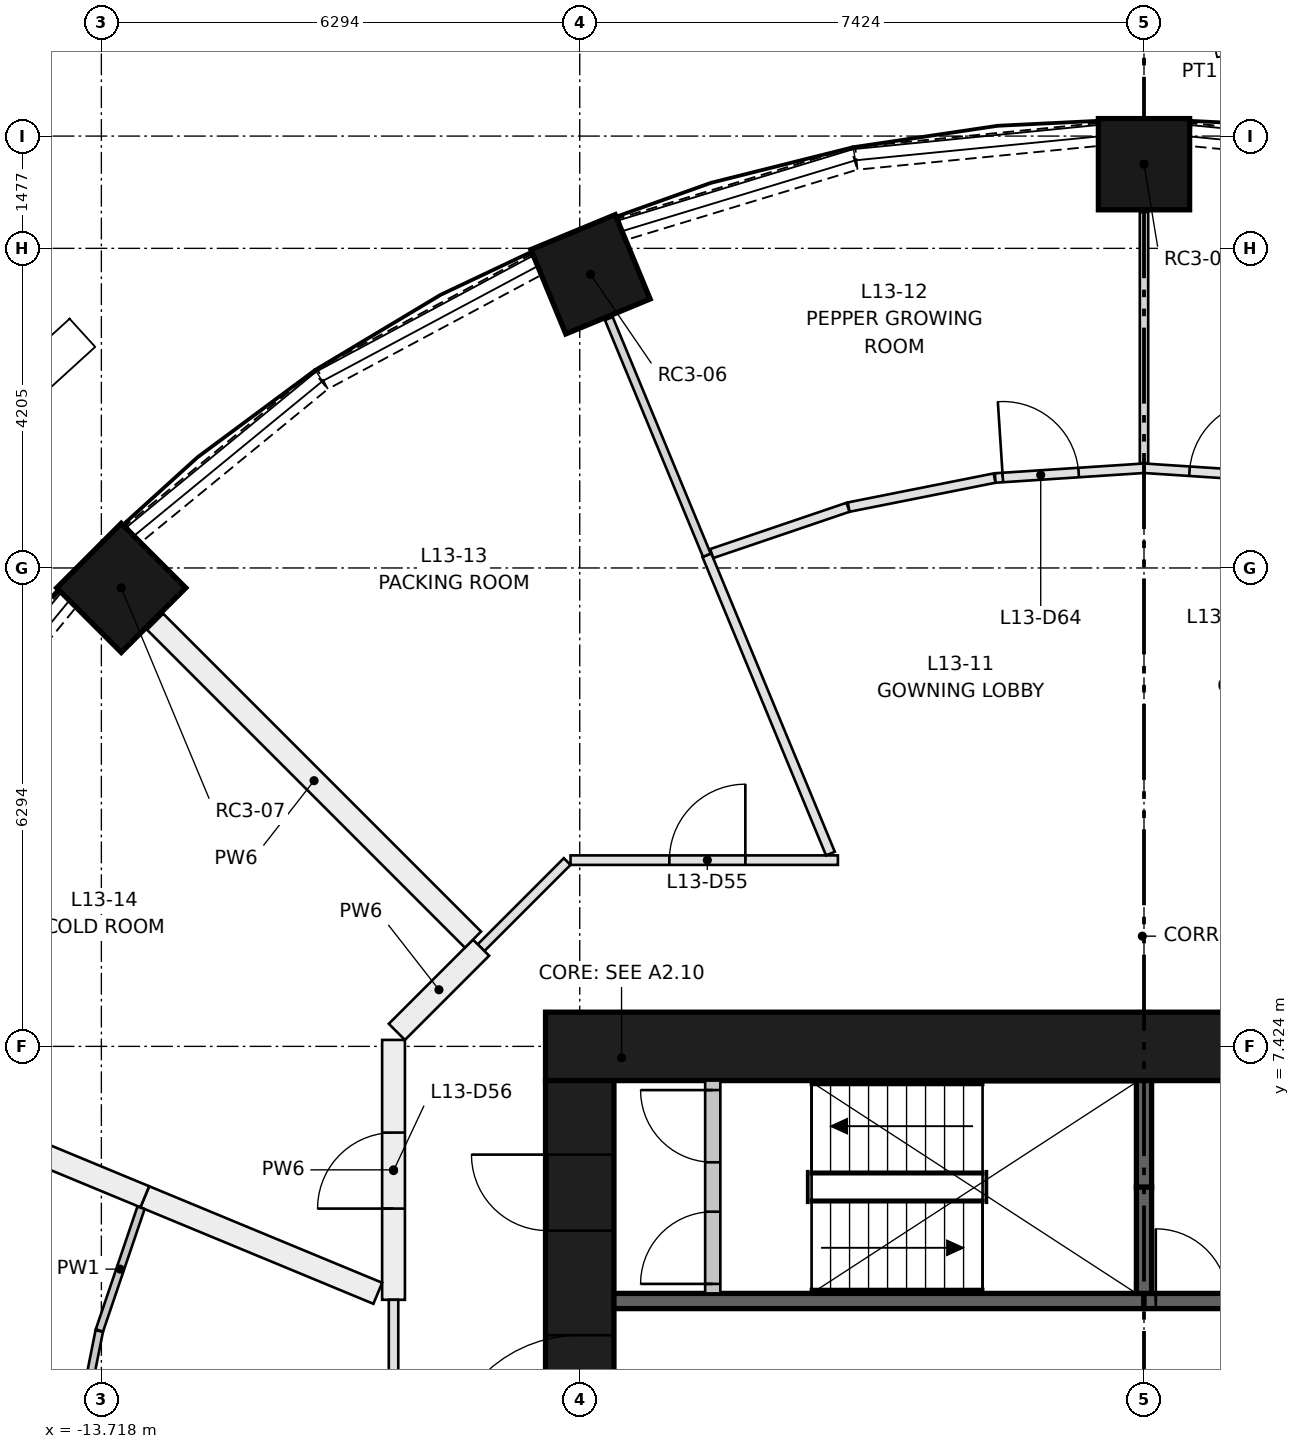
"""IFC4 building model, lengths in metres.
Left out: names, types, materials, properties, quantities, classifications, styles, units other than length and angle.
Written with IfcOpenShell. Run it as: python <this file> out.ifc"""

import sys

from ifc_helpers import new_model, si_unit, direction, frame, frame_2d, origin, origin_2d, place, context, subcontext, project, spatial, rectangle, extrude, element, fill, save


model = new_model("IFC4")
c1 = context("Model", 3, precision=1e-05, world=origin(), true_north=direction((0.0, 1.0)))
c2 = subcontext(c1, "Body", "Model", "MODEL_VIEW")
j1 = project(units=[si_unit("LENGTHUNIT", "METRE"), si_unit("PLANEANGLEUNIT", "RADIAN")], contexts=[c1])
p1 = place(None, origin())
s1 = spatial("IfcSite", under=j1, at=p1, CompositionType="ELEMENT")
p2 = place(p1, origin())
s2 = spatial("IfcBuilding", under=s1, at=p2, CompositionType="ELEMENT")
p3 = place(p2, frame((0.0, 0.0, 51.75)))
s3 = spatial("IfcBuildingStorey", under=s2, at=p3, CompositionType="ELEMENT", Elevation=51.75)
for number, where, z_axis, x_axis in (
    (1, (0.0, 19.03, 0.0), (0.0, 0.0, 1.0), (0.0, 1.0, 0.0)),
    (2, (-7.282, 17.582, 0.0), (0.0, 0.0, 1.0), (-0.383, 0.924, 0.0)),
    (3, (-13.456, 13.456, 0.0), (0.0, 0.0, 1.0), (-0.707, 0.707, 0.0)),
):
    element("IfcColumn", number, at=place(p3, frame(where, z_axis=z_axis, x_axis=x_axis)), inside=s3, PredefinedType="COLUMN", context=c2, shape_type="SweptSolid", body=[
        extrude(rectangle(XDim=1.2, YDim=1.2, at=origin_2d()), origin(), (0.0, 0.0, 1.0), 3.65),
    ])
p4 = place(p3, frame((-7.874, 7.424, 0.0), z_axis=(0.0, 0.0, 1.0), x_axis=(1.0, 0.0, 0.0)))
e4 = element("IfcWall", 4, at=p4, inside=s3, PredefinedType="SHEAR", context=c2, shape_type="SweptSolid", body=[
    extrude(rectangle(XDim=15.748, YDim=0.9, at=frame_2d((7.874, 0.0))), origin(), (0.0, 0.0, 1.0), 3.65),
])
p5 = place(p3, frame((-7.424, -6.974, 0.0), z_axis=(0.0, 0.0, 1.0), x_axis=(0.0, 1.0, 0.0)))
e5 = element("IfcWall", 5, at=p5, inside=s3, PredefinedType="SHEAR", context=c2, shape_type="SweptSolid", body=[
    extrude(rectangle(XDim=13.948, YDim=0.9, at=frame_2d((6.974, 0.0))), origin(), (0.0, 0.0, 1.0), 3.65),
])
p6 = place(p5, frame((6.474, 0.0, 0.0)))
e6 = element("IfcOpeningElement", 6, at=p6, cuts=e5, PredefinedType="OPENING", context=c2, shape_type="SweptSolid", body=[
    extrude(rectangle(XDim=1.0, YDim=2.1, at=frame_2d((0.5, 1.05))), frame((0.0, 0.46, 0.0), z_axis=(0.0, -1.0, 0.0), x_axis=(1.0, 0.0, 0.0)), (0.0, 0.0, 1.0), 0.92),
])
p7 = place(p5, frame((3.35, 0.0, 0.0)))
e7 = element("IfcOpeningElement", 7, at=p7, cuts=e5, PredefinedType="OPENING", context=c2, shape_type="SweptSolid", body=[
    extrude(rectangle(XDim=1.8, YDim=2.1, at=frame_2d((0.9, 1.05))), frame((0.0, 0.46, 0.0), z_axis=(0.0, -1.0, 0.0), x_axis=(1.0, 0.0, 0.0)), (0.0, 0.0, 1.0), 0.92),
])
p8 = place(p5, frame((8.799, 0.0, 0.0)))
e8 = element("IfcOpeningElement", 8, at=p8, cuts=e5, PredefinedType="OPENING", context=c2, shape_type="SweptSolid", body=[
    extrude(rectangle(XDim=1.8, YDim=2.1, at=frame_2d((0.9, 1.05))), frame((0.0, 0.46, 0.0), z_axis=(0.0, -1.0, 0.0), x_axis=(1.0, 0.0, 0.0)), (0.0, 0.0, 1.0), 0.92),
])
p9 = place(p5, frame((11.974, 0.0, 0.0)))
e9 = element("IfcOpeningElement", 9, at=p9, cuts=e5, PredefinedType="OPENING", context=c2, shape_type="SweptSolid", body=[
    extrude(rectangle(XDim=1.0, YDim=2.1, at=frame_2d((0.5, 1.05))), frame((0.0, 0.46, 0.0), z_axis=(0.0, -1.0, 0.0), x_axis=(1.0, 0.0, 0.0)), (0.0, 0.0, 1.0), 0.92),
])
p10 = place(p3, frame((-6.974, 4.074, 0.0), z_axis=(0.0, 0.0, 1.0), x_axis=(1.0, 0.0, 0.0)))
e10 = element("IfcWall", 10, at=p10, inside=s3, PredefinedType="SHEAR", context=c2, shape_type="SweptSolid", body=[
    extrude(rectangle(XDim=6.974, YDim=0.2, at=frame_2d((3.487, 0.0))), origin(), (0.0, 0.0, 1.0), 3.3),
])
p11 = place(p3, frame((0.0, 4.074, 0.0), z_axis=(0.0, 0.0, 1.0), x_axis=(1.0, 0.0, 0.0)))
e11 = element("IfcWall", 11, at=p11, inside=s3, PredefinedType="SHEAR", context=c2, shape_type="SweptSolid", body=[
    extrude(rectangle(XDim=6.974, YDim=0.2, at=frame_2d((3.487, 0.0))), origin(), (0.0, 0.0, 1.0), 3.3),
])
p12 = place(p11, frame((0.155, 0.0, 0.0)))
e12 = element("IfcOpeningElement", 12, at=p12, cuts=e11, PredefinedType="OPENING", context=c2, shape_type="SweptSolid", body=[
    extrude(rectangle(XDim=0.95, YDim=2.1, at=frame_2d((0.475, 1.05))), frame((0.0, 0.11, 0.0), z_axis=(0.0, -1.0, 0.0), x_axis=(1.0, 0.0, 0.0)), (0.0, 0.0, 1.0), 0.22),
])
p13 = place(p11, frame((1.459, 0.0, 0.0)))
e13 = element("IfcOpeningElement", 13, at=p13, cuts=e11, PredefinedType="OPENING", context=c2, shape_type="SweptSolid", body=[
    extrude(rectangle(XDim=0.95, YDim=2.1, at=frame_2d((0.475, 1.05))), frame((0.0, 0.11, 0.0), z_axis=(0.0, -1.0, 0.0), x_axis=(1.0, 0.0, 0.0)), (0.0, 0.0, 1.0), 0.22),
])
p14 = place(p11, frame((2.883, 0.0, 0.0)))
e14 = element("IfcOpeningElement", 14, at=p14, cuts=e11, PredefinedType="OPENING", context=c2, shape_type="SweptSolid", body=[
    extrude(rectangle(XDim=0.8, YDim=2.1, at=frame_2d((0.4, 1.05))), frame((0.0, 0.11, 0.0), z_axis=(0.0, -1.0, 0.0), x_axis=(1.0, 0.0, 0.0)), (0.0, 0.0, 1.0), 0.22),
])
p15 = place(p11, frame((4.156, 0.0, 0.0)))
e15 = element("IfcOpeningElement", 15, at=p15, cuts=e11, PredefinedType="OPENING", context=c2, shape_type="SweptSolid", body=[
    extrude(rectangle(XDim=0.95, YDim=2.1, at=frame_2d((0.475, 1.05))), frame((0.0, 0.11, 0.0), z_axis=(0.0, -1.0, 0.0), x_axis=(1.0, 0.0, 0.0)), (0.0, 0.0, 1.0), 0.22),
])
p16 = place(p11, frame((5.79, 0.0, 0.0)))
e16 = element("IfcOpeningElement", 16, at=p16, cuts=e11, PredefinedType="OPENING", context=c2, shape_type="SweptSolid", body=[
    extrude(rectangle(XDim=0.8, YDim=2.1, at=frame_2d((0.4, 1.05))), frame((0.0, 0.11, 0.0), z_axis=(0.0, -1.0, 0.0), x_axis=(1.0, 0.0, 0.0)), (0.0, 0.0, 1.0), 0.22),
])
p17 = place(p3, frame((0.0, 4.174, 0.0), z_axis=(0.0, 0.0, 1.0), x_axis=(0.0, 1.0, 0.0)))
e17 = element("IfcWall", 17, at=p17, inside=s3, PredefinedType="SHEAR", context=c2, shape_type="SweptSolid", body=[
    extrude(rectangle(XDim=1.4, YDim=0.2, at=frame_2d((0.7, 0.0))), origin(), (0.0, 0.0, 1.0), 3.3),
])
p18 = place(p3, frame((0.0, 5.574, 0.0), z_axis=(0.0, 0.0, 1.0), x_axis=(0.0, 1.0, 0.0)))
e18 = element("IfcWall", 18, at=p18, inside=s3, PredefinedType="SHEAR", context=c2, shape_type="SweptSolid", body=[
    extrude(rectangle(XDim=1.4, YDim=0.2, at=frame_2d((0.7, 0.0))), origin(), (0.0, 0.0, 1.0), 3.3),
])
p19 = place(p3, frame((-5.674, 4.174, 0.0), z_axis=(0.0, 0.0, 1.0), x_axis=(0.0, 1.0, 0.0)))
e19 = element("IfcWall", 19, at=p19, inside=s3, PredefinedType="PARTITIONING", context=c2, shape_type="SweptSolid", body=[
    extrude(rectangle(XDim=2.8, YDim=0.2, at=frame_2d((1.4, 0.0))), origin(), (0.0, 0.0, 1.0), 3.3),
])
p20 = place(p19, frame((0.125, 0.0, 0.0)))
e20 = element("IfcOpeningElement", 20, at=p20, cuts=e19, PredefinedType="OPENING", context=c2, shape_type="SweptSolid", body=[
    extrude(rectangle(XDim=0.95, YDim=2.1, at=frame_2d((0.475, 1.05))), frame((0.0, 0.11, 0.0), z_axis=(0.0, -1.0, 0.0), x_axis=(1.0, 0.0, 0.0)), (0.0, 0.0, 1.0), 0.22),
])
p21 = place(p19, frame((1.725, 0.0, 0.0)))
e21 = element("IfcOpeningElement", 21, at=p21, cuts=e19, PredefinedType="OPENING", context=c2, shape_type="SweptSolid", body=[
    extrude(rectangle(XDim=0.95, YDim=2.1, at=frame_2d((0.475, 1.05))), frame((0.0, 0.11, 0.0), z_axis=(0.0, -1.0, 0.0), x_axis=(1.0, 0.0, 0.0)), (0.0, 0.0, 1.0), 0.22),
])
for number, where, z_axis, x_axis in (
    (22, (3.785, 19.107, 0.0), (0.0, 0.0, 1.0), (-0.995, 0.098, 0.0)),
    (23, (-0.613, 19.419, 0.0), (0.0, 0.0, 1.0), (-0.995, -0.098, 0.0)),
):
    element("IfcWall", number, at=place(p3, frame(where, z_axis=z_axis, x_axis=x_axis)), inside=s3, PredefinedType="SOLIDWALL", context=c2, shape_type="SweptSolid", body=[
        extrude(rectangle(XDim=3.188, YDim=0.3, at=frame_2d((1.594, 0.0))), origin(), (0.0, 0.0, 1.0), 0.9),
    ])
p22 = place(p3, frame((-3.814, 19.102, 0.0), z_axis=(0.0, 0.0, 1.0), x_axis=(-0.956849017819, -0.290585541792, 0.0)))
e24 = element("IfcWall", 24, at=p22, inside=s3, PredefinedType="SOLIDWALL", context=c2, shape_type="SweptSolid", body=[
    extrude(rectangle(XDim=3.188, YDim=0.3, at=frame_2d((1.594, 0.0))), origin(), (0.0, 0.0, 1.0), 0.9),
])
p23 = place(p3, frame((-7.998, 17.706, 0.0), z_axis=(0.0, 0.0, 1.0), x_axis=(-0.881994263934, -0.471260138764, 0.0)))
e25 = element("IfcWall", 25, at=p23, inside=s3, PredefinedType="SOLIDWALL", context=c2, shape_type="SweptSolid", body=[
    extrude(rectangle(XDim=3.187, YDim=0.3, at=frame_2d((1.593, 0.0))), origin(), (0.0, 0.0, 1.0), 0.9),
])
for number, where, z_axis, x_axis in (
    (26, (-10.833, 16.188, 0.0), (0.0, 0.0, 1.0), (-0.773, -0.634, 0.0)),
    (27, (-14.166, 13.298, 0.0), (0.0, 0.0, 1.0), (-0.634, -0.773, 0.0)),
):
    element("IfcWall", number, at=place(p3, frame(where, z_axis=z_axis, x_axis=x_axis)), inside=s3, PredefinedType="SOLIDWALL", context=c2, shape_type="SweptSolid", body=[
        extrude(rectangle(XDim=3.188, YDim=0.3, at=frame_2d((1.594, 0.0))), origin(), (0.0, 0.0, 1.0), 0.9),
    ])
p24 = place(p3, frame((-8.722, 8.722, 0.0), z_axis=(0.0, 0.0, 1.0), x_axis=(0.707030604857, 0.70718294931, 0.0)))
e28 = element("IfcWall", 28, at=p24, inside=s3, PredefinedType="PARTITIONING", context=c2, shape_type="SweptSolid", body=[
    extrude(rectangle(XDim=1.603, YDim=0.125, at=frame_2d((0.801, 0.0))), origin(), (0.0, 0.0, 1.0), 3.3),
])
p25 = place(p3, frame((-7.545, 9.874, 0.0), z_axis=(0.0, 0.0, 1.0), x_axis=(1.0, 0.0, 0.0)))
e29 = element("IfcWall", 29, at=p25, inside=s3, PredefinedType="PARTITIONING", context=c2, shape_type="SweptSolid", body=[
    extrude(rectangle(XDim=3.518, YDim=0.125, at=frame_2d((1.759, 0.0))), origin(), (0.0, 0.0, 1.0), 3.3),
])
p26 = place(p25, frame((1.3, 0.0, 0.0)))
e30 = element("IfcOpeningElement", 30, at=p26, cuts=e29, PredefinedType="OPENING", context=c2, shape_type="SweptSolid", body=[
    extrude(rectangle(XDim=1.0, YDim=2.1, at=frame_2d((0.5, 1.05))), frame((0.0, 0.073, 0.0), z_axis=(0.0, -1.0, 0.0), x_axis=(1.0, 0.0, 0.0)), (0.0, 0.0, 1.0), 0.145),
])
p27 = place(p3, frame((-9.874, 4.09, 0.0), z_axis=(0.0, 0.0, 1.0), x_axis=(0.0, 1.0, 0.0)))
e31 = element("IfcWall", 31, at=p27, inside=s3, PredefinedType="PARTITIONING", context=c2, shape_type="SweptSolid", body=[
    extrude(rectangle(XDim=3.419, YDim=0.3, at=frame_2d((1.709, 0.0))), origin(), (0.0, 0.0, 1.0), 3.3),
])
p28 = place(p27, frame((1.2, 0.0, 0.0)))
e32 = element("IfcOpeningElement", 32, at=p28, cuts=e31, PredefinedType="OPENING", context=c2, shape_type="SweptSolid", body=[
    extrude(rectangle(XDim=1.0, YDim=2.1, at=frame_2d((0.5, 1.05))), frame((0.0, 0.16, 0.0), z_axis=(0.0, -1.0, 0.0), x_axis=(1.0, 0.0, 0.0)), (0.0, 0.0, 1.0), 0.32),
])
p29 = place(p3, frame((-9.83, 7.615, 0.0), z_axis=(0.0, 0.0, 1.0), x_axis=(0.70718471217, 0.707028841614, 0.0)))
e33 = element("IfcWall", 33, at=p29, inside=s3, PredefinedType="PARTITIONING", context=c2, shape_type="SweptSolid", body=[
    extrude(rectangle(XDim=1.566, YDim=0.3, at=frame_2d((0.783, 0.0))), origin(), (0.0, 0.0, 1.0), 3.3),
])
p30 = place(p3, frame((-9.874, 0.0, 0.0), z_axis=(0.0, 0.0, 1.0), x_axis=(0.0, 1.0, 0.0)))
e34 = element("IfcWall", 34, at=p30, inside=s3, PredefinedType="PARTITIONING", context=c2, shape_type="SweptSolid", body=[
    extrude(rectangle(XDim=4.09, YDim=0.125, at=frame_2d((2.045, 0.0))), origin(), (0.0, 0.0, 1.0), 3.3),
])
p31 = place(p30, frame((1.5, 0.0, 0.0)))
e35 = element("IfcOpeningElement", 35, at=p31, cuts=e34, PredefinedType="OPENING", context=c2, shape_type="SweptSolid", body=[
    extrude(rectangle(XDim=1.0, YDim=2.1, at=frame_2d((0.5, 1.05))), frame((0.0, 0.073, 0.0), z_axis=(0.0, -1.0, 0.0), x_axis=(1.0, 0.0, 0.0)), (0.0, 0.0, 1.0), 0.145),
])
p32 = place(p3, frame((0.0, 15.03, 0.0), z_axis=(0.0, 0.0, 1.0), x_axis=(0.997855616904, -0.065453554619, 0.0)))
e36 = element("IfcWall", 36, at=p32, inside=s3, PredefinedType="PARTITIONING", context=c2, shape_type="SweptSolid", body=[
    extrude(rectangle(XDim=1.962, YDim=0.125, at=frame_2d((0.981, 0.0))), origin(), (0.0, 0.0, 1.0), 3.3),
])
p33 = place(p32, frame((0.6, 0.0, 0.0)))
e37 = element("IfcOpeningElement", 37, at=p33, cuts=e36, PredefinedType="OPENING", context=c2, shape_type="SweptSolid", body=[
    extrude(rectangle(XDim=1.0, YDim=2.1, at=frame_2d((0.5, 1.05))), frame((0.0, 0.073, 0.0), z_axis=(0.0, -1.0, 0.0), x_axis=(1.0, 0.0, 0.0)), (0.0, 0.0, 1.0), 0.145),
])
p34 = place(p3, frame((0.0, 15.096, 0.0), z_axis=(0.0, 0.0, 1.0), x_axis=(0.0, 1.0, 0.0)))
e38 = element("IfcWall", 38, at=p34, inside=s3, PredefinedType="PARTITIONING", context=c2, shape_type="SweptSolid", body=[
    extrude(rectangle(XDim=3.304, YDim=0.11, at=frame_2d((1.652, 0.0))), origin(), (0.0, 0.0, 1.0), 3.3),
])
p35 = place(p3, frame((-5.688, 13.907, 0.0), z_axis=(0.0, 0.0, 1.0), x_axis=(0.946929690395, 0.321440758848, 0.0)))
e39 = element("IfcWall", 39, at=p35, inside=s3, PredefinedType="PARTITIONING", context=c2, shape_type="SweptSolid", body=[
    extrude(rectangle(XDim=1.895, YDim=0.125, at=frame_2d((0.948, 0.0))), origin(), (0.0, 0.0, 1.0), 3.3),
])
p36 = place(p3, frame((-3.886, 14.519, 0.0), z_axis=(0.0, 0.0, 1.0), x_axis=(0.980795915473, 0.19503684829, 0.0)))
e40 = element("IfcWall", 40, at=p36, inside=s3, PredefinedType="PARTITIONING", context=c2, shape_type="SweptSolid", body=[
    extrude(rectangle(XDim=1.958, YDim=0.125, at=frame_2d((0.979, 0.0))), origin(), (0.0, 0.0, 1.0), 3.3),
])
p37 = place(p3, frame((-1.958, 14.902, 0.0), z_axis=(0.0, 0.0, 1.0), x_axis=(0.997855616904, 0.065453554619, 0.0)))
e41 = element("IfcWall", 41, at=p37, inside=s3, PredefinedType="PARTITIONING", context=c2, shape_type="SweptSolid", body=[
    extrude(rectangle(XDim=1.962, YDim=0.125, at=frame_2d((0.981, 0.0))), origin(), (0.0, 0.0, 1.0), 3.3),
])
p38 = place(p37, frame((0.1, 0.0, 0.0)))
e42 = element("IfcOpeningElement", 42, at=p38, cuts=e41, PredefinedType="OPENING", context=c2, shape_type="SweptSolid", body=[
    extrude(rectangle(XDim=1.0, YDim=2.1, at=frame_2d((0.5, 1.05))), frame((0.0, 0.073, 0.0), z_axis=(0.0, -1.0, 0.0), x_axis=(1.0, 0.0, 0.0)), (0.0, 0.0, 1.0), 0.145),
])
p39 = place(p3, frame((-4.126, 9.96, 0.0), z_axis=(0.0, 0.0, 1.0), x_axis=(-0.382676572561, 0.923882373905, 0.0)))
e43 = element("IfcWall", 43, at=p39, inside=s3, PredefinedType="PARTITIONING", context=c2, shape_type="SweptSolid", body=[
    extrude(rectangle(XDim=4.249, YDim=0.125, at=frame_2d((2.125, 0.0))), origin(), (0.0, 0.0, 1.0), 3.3),
])
p40 = place(p3, frame((-5.752, 13.886, 0.0), z_axis=(0.0, 0.0, 1.0), x_axis=(-0.382716478617, 0.923865843613, 0.0)))
e44 = element("IfcWall", 44, at=p40, inside=s3, PredefinedType="PARTITIONING", context=c2, shape_type="SweptSolid", body=[
    extrude(rectangle(XDim=3.37, YDim=0.11, at=frame_2d((1.685, 0.0))), origin(), (0.0, 0.0, 1.0), 3.3),
])
p41 = place(p3, frame((-8.829, 8.829, 0.0), z_axis=(0.0, 0.0, 1.0), x_axis=(-0.707106781187, 0.707106781187, 0.0)))
e45 = element("IfcWall", 45, at=p41, inside=s3, PredefinedType="PARTITIONING", context=c2, shape_type="SweptSolid", body=[
    extrude(rectangle(XDim=5.914, YDim=0.3, at=frame_2d((2.957, 0.0))), origin(), (0.0, 0.0, 1.0), 3.3),
])
p42 = place(p3, frame((-10.081, 4.176, 0.0), z_axis=(0.0, 0.0, 1.0), x_axis=(-0.923876033225, 0.382691880281, 0.0)))
e46 = element("IfcWall", 46, at=p42, inside=s3, PredefinedType="PARTITIONING", context=c2, shape_type="SweptSolid", body=[
    extrude(rectangle(XDim=3.318, YDim=0.3, at=frame_2d((1.659, 0.0))), origin(), (0.0, 0.0, 1.0), 3.3),
])
p43 = place(p3, frame((-13.147, 5.446, 0.0), z_axis=(0.0, 0.0, 1.0), x_axis=(-0.923873410436, 0.382698212028, 0.0)))
e47 = element("IfcWall", 47, at=p43, inside=s3, PredefinedType="PARTITIONING", context=c2, shape_type="SweptSolid", body=[
    extrude(rectangle(XDim=4.17, YDim=0.3, at=frame_2d((2.085, 0.0))), origin(), (0.0, 0.0, 1.0), 3.3),
])
p44 = place(p3, frame((-14.108, 1.861, 0.0), z_axis=(0.0, 0.0, 1.0), x_axis=(0.195204777565, 0.980762506836, 0.0)))
e48 = element("IfcWall", 48, at=p44, inside=s3, PredefinedType="PARTITIONING", context=c2, shape_type="SweptSolid", body=[
    extrude(rectangle(XDim=1.855, YDim=0.1, at=frame_2d((0.927, 0.0))), origin(), (0.0, 0.0, 1.0), 3.3),
])
p45 = place(p3, frame((-13.744, 3.686, 0.0), z_axis=(0.0, 0.0, 1.0), x_axis=(0.321250473512, 0.946994262532, 0.0)))
e49 = element("IfcWall", 49, at=p45, inside=s3, PredefinedType="PARTITIONING", context=c2, shape_type="SweptSolid", body=[
    extrude(rectangle(XDim=1.705, YDim=0.1, at=frame_2d((0.852, 0.0))), origin(), (0.0, 0.0, 1.0), 3.3),
])
p46 = place(p20, origin())
e50 = element("IfcDoor", 50, at=p46, inside=s3, OperationType="SINGLE_SWING_LEFT", PredefinedType="DOOR", context=c2, shape_type="SweptSolid", body=[
    extrude(rectangle(XDim=0.95, YDim=2.1, at=frame_2d((0.475, 1.05))), frame((0.0, 0.025, 0.0), z_axis=(0.0, -1.0, 0.0), x_axis=(1.0, 0.0, 0.0)), (0.0, 0.0, 1.0), 0.05),
])
fill(e20, e50)
p47 = place(p21, origin())
e51 = element("IfcDoor", 51, at=p47, inside=s3, OperationType="SINGLE_SWING_RIGHT", PredefinedType="DOOR", context=c2, shape_type="SweptSolid", body=[
    extrude(rectangle(XDim=0.95, YDim=2.1, at=frame_2d((0.475, 1.05))), frame((0.0, 0.025, 0.0), z_axis=(0.0, -1.0, 0.0), x_axis=(1.0, 0.0, 0.0)), (0.0, 0.0, 1.0), 0.05),
])
fill(e21, e51)
p48 = place(p12, origin())
e52 = element("IfcDoor", 52, at=p48, inside=s3, OperationType="SINGLE_SWING_LEFT", PredefinedType="DOOR", context=c2, shape_type="SweptSolid", body=[
    extrude(rectangle(XDim=0.95, YDim=2.1, at=frame_2d((0.475, 1.05))), frame((0.0, 0.025, 0.0), z_axis=(0.0, -1.0, 0.0), x_axis=(1.0, 0.0, 0.0)), (0.0, 0.0, 1.0), 0.05),
])
fill(e12, e52)
p49 = place(p8, origin())
e53 = element("IfcDoor", 53, at=p49, inside=s3, OperationType="DOUBLE_DOOR_SINGLE_SWING", PredefinedType="DOOR", context=c2, shape_type="SweptSolid", body=[
    extrude(rectangle(XDim=1.8, YDim=2.1, at=frame_2d((0.9, 1.05))), frame((0.0, 0.025, 0.0), z_axis=(0.0, -1.0, 0.0), x_axis=(1.0, 0.0, 0.0)), (0.0, 0.0, 1.0), 0.05),
])
fill(e8, e53)
p50 = place(p9, origin())
e54 = element("IfcDoor", 54, at=p50, inside=s3, OperationType="SINGLE_SWING_RIGHT", PredefinedType="DOOR", context=c2, shape_type="SweptSolid", body=[
    extrude(rectangle(XDim=1.0, YDim=2.1, at=frame_2d((0.5, 1.05))), frame((0.0, 0.45, 0.0), z_axis=(0.0, -1.0, 0.0), x_axis=(1.0, 0.0, 0.0)), (0.0, 0.0, 1.0), 0.05),
])
fill(e9, e54)
p51 = place(p26, origin())
e55 = element("IfcDoor", 55, at=p51, inside=s3, OperationType="SINGLE_SWING_RIGHT", PredefinedType="DOOR", context=c2, shape_type="SweptSolid", body=[
    extrude(rectangle(XDim=1.0, YDim=2.1, at=frame_2d((0.5, 1.05))), frame((0.0, 0.025, 0.0), z_axis=(0.0, -1.0, 0.0), x_axis=(1.0, 0.0, 0.0)), (0.0, 0.0, 1.0), 0.05),
])
fill(e30, e55)
p52 = place(p28, origin())
e56 = element("IfcDoor", 56, at=p52, inside=s3, OperationType="SINGLE_SWING_LEFT", PredefinedType="DOOR", context=c2, shape_type="SweptSolid", body=[
    extrude(rectangle(XDim=1.0, YDim=2.1, at=frame_2d((0.5, 1.05))), frame((0.0, 0.025, 0.0), z_axis=(0.0, -1.0, 0.0), x_axis=(1.0, 0.0, 0.0)), (0.0, 0.0, 1.0), 0.05),
])
fill(e32, e56)
p53 = place(p33, origin())
e57 = element("IfcDoor", 57, at=p53, inside=s3, OperationType="SINGLE_SWING_RIGHT", PredefinedType="DOOR", context=c2, shape_type="SweptSolid", body=[
    extrude(rectangle(XDim=1.0, YDim=2.1, at=frame_2d((0.5, 1.05))), frame((0.0, 0.025, 0.0), z_axis=(0.0, -1.0, 0.0), x_axis=(1.0, 0.0, 0.0)), (0.0, 0.0, 1.0), 0.05),
])
fill(e37, e57)
p54 = place(p38, origin())
e58 = element("IfcDoor", 58, at=p54, inside=s3, OperationType="SINGLE_SWING_LEFT", PredefinedType="DOOR", context=c2, shape_type="SweptSolid", body=[
    extrude(rectangle(XDim=1.0, YDim=2.1, at=frame_2d((0.5, 1.05))), frame((0.0, 0.025, 0.0), z_axis=(0.0, -1.0, 0.0), x_axis=(1.0, 0.0, 0.0)), (0.0, 0.0, 1.0), 0.05),
])
fill(e42, e58)
save(model, sys.argv[1])
